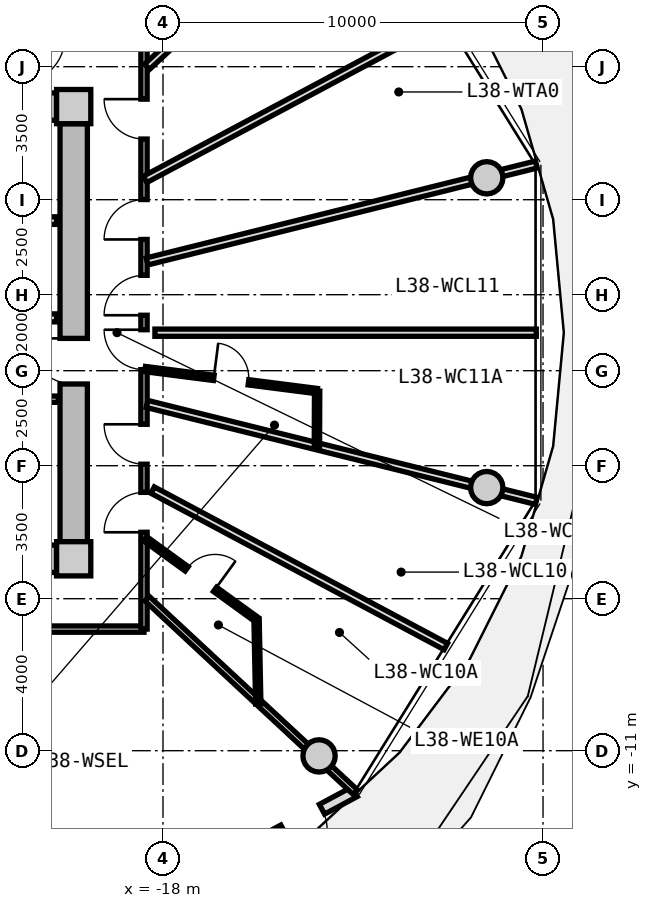
"""IFC4 building model, lengths in metres.
Left out: names, types, materials, properties, quantities, classifications, styles, units other than length and angle.
Written with IfcOpenShell. Run it as: python <this file> out.ifc"""

import sys

from ifc_helpers import new_model, si_unit, direction, frame, frame_2d, origin, origin_2d, place, context, subcontext, project, spatial, rectangle, circle, extrude, source, transform, mapped, element, fill, save


model = new_model("IFC4")
c1 = context("Model", 3, precision=1e-05, world=origin(), true_north=direction((0.0, 1.0)))
c2 = subcontext(c1, "Body", "Model", "MODEL_VIEW")
j1 = project(units=[si_unit("LENGTHUNIT", "METRE"), si_unit("PLANEANGLEUNIT", "RADIAN")], contexts=[c1])
p1 = place(None, origin())
s1 = spatial("IfcSite", under=j1, at=p1, CompositionType="ELEMENT")
p2 = place(p1, origin())
s2 = spatial("IfcBuilding", under=s1, at=p2, CompositionType="ELEMENT")
p3 = place(p2, frame((0.0, 0.0, 123.7)))
s3 = spatial("IfcBuildingStorey", under=s2, at=p3, CompositionType="ELEMENT", Elevation=123.7)
m1 = source(origin(), c2, "Body", "SweptSolid", [
    extrude(rectangle(XDim=0.9, YDim=0.9, at=origin_2d()), origin(), (0.0, 0.0, 1.0), 3.05),
])
for number, where, z_axis, x_axis in (
    (1, (-20.35, -5.95, 0.0), (0.0, 0.0, 1.0), (1.0, 0.0, 0.0)),
    (2, (-20.35, 5.95, 0.0), (0.0, 0.0, 1.0), (1.0, 0.0, 0.0)),
):
    element("IfcColumn", number, at=place(p3, frame(where, z_axis=z_axis, x_axis=x_axis)), inside=s3, PredefinedType="COLUMN", context=c2, shape_type="MappedRepresentation", body=[
        mapped(m1, transform((0.0, 0.0, 0.0), x_axis=(1.0, 0.0, 0.0), y_axis=(0.0, 1.0, 0.0), z_axis=(0.0, 0.0, 1.0), scale=1.0)),
    ])
m2 = source(origin(), c2, "Body", "SweptSolid", [
    extrude(rectangle(XDim=14.4, YDim=0.72, at=frame_2d((7.2, 0.0))), origin(), (0.0, 0.0, 1.0), 2.79),
])
for number, where, z_axis, x_axis in (
    (3, (-35.2, 5.95, 0.0), (0.0, 0.0, 1.0), (1.0, 0.0, 0.0)),
    (4, (-20.8, -5.95, 0.0), (0.0, 0.0, 1.0), (-1.0, 0.0, 0.0)),
):
    element("IfcWall", number, at=place(p3, frame(where, z_axis=z_axis, x_axis=x_axis)), inside=s3, PredefinedType="SHEAR", context=c2, shape_type="MappedRepresentation", body=[
        mapped(m2, transform((0.0, 0.0, 0.0), x_axis=(1.0, 0.0, 0.0), y_axis=(0.0, 1.0, 0.0), z_axis=(0.0, 0.0, 1.0), scale=1.0)),
    ])
m3 = source(origin(), c2, "Body", "SweptSolid", [
    extrude(rectangle(XDim=11.0, YDim=0.72, at=frame_2d((5.5, 0.0))), origin(), (0.0, 0.0, 1.0), 2.79),
])
p4 = place(p3, frame((-20.35, 5.5, 0.0), z_axis=(0.0, 0.0, 1.0), x_axis=(0.0, -1.0, 0.0)))
e5 = element("IfcWall", 5, at=p4, inside=s3, PredefinedType="SHEAR", context=c2, shape_type="MappedRepresentation", body=[
    mapped(m3, transform((0.0, 0.0, 0.0), x_axis=(1.0, 0.0, 0.0), y_axis=(0.0, 1.0, 0.0), z_axis=(0.0, 0.0, 1.0), scale=1.0)),
])
p5 = place(p4, frame((5.65, 0.0, 0.0)))
e6 = element("IfcOpeningElement", 6, at=p5, cuts=e5, PredefinedType="OPENING", context=c2, shape_type="SweptSolid", body=[
    extrude(rectangle(XDim=1.2, YDim=2.15, at=frame_2d((0.6, 1.075))), frame((0.0, 0.37, 0.0), z_axis=(0.0, -1.0, 0.0), x_axis=(1.0, 0.0, 0.0)), (0.0, 0.0, 1.0), 0.74),
])
m4 = source(origin(), c2, "Body", "SweptSolid", [
    extrude(circle(Radius=0.425, at=origin_2d()), origin(), (0.0, 0.0, 1.0), 3.05),
])
for number, where, z_axis, x_axis in (
    (7, (-9.481, 4.076, 0.0), (0.0, 0.0, 1.0), (1.0, 0.0, 0.0)),
    (8, (-13.894, -11.137, 0.0), (0.0, 0.0, 1.0), (1.0, 0.0, 0.0)),
    (9, (-9.481, -4.076, 0.0), (0.0, 0.0, 1.0), (1.0, 0.0, 0.0)),
):
    element("IfcColumn", number, at=place(p3, frame(where, z_axis=z_axis, x_axis=x_axis)), inside=s3, PredefinedType="COLUMN", context=c2, shape_type="MappedRepresentation", body=[
        mapped(m4, transform((0.0, 0.0, 0.0), x_axis=(1.0, 0.0, 0.0), y_axis=(0.0, 1.0, 0.0), z_axis=(0.0, 0.0, 1.0), scale=1.0)),
    ])
m5 = source(origin(), c2, "Body", "SweptSolid", [
    extrude(rectangle(XDim=9.351, YDim=0.29, at=frame_2d((4.675, 0.0))), origin(), (0.0, 0.0, 1.0), 2.79),
])
p6 = place(p3, frame((-12.953, -12.077, 0.0), z_axis=(0.0, 0.0, 1.0), x_axis=(-0.881184411073, -0.472772708267, 0.0)))
e10 = element("IfcWall", 10, at=p6, inside=s3, PredefinedType="SOLIDWALL", context=c2, shape_type="MappedRepresentation", body=[
    mapped(m5, transform((0.0, 0.0, 0.0), x_axis=(1.0, 0.0, 0.0), y_axis=(0.0, 1.0, 0.0), z_axis=(0.0, 0.0, 1.0), scale=1.0)),
])
p7 = place(p6, frame((0.98, 0.0, 0.0)))
e11 = element("IfcOpeningElement", 11, at=p7, cuts=e10, PredefinedType="OPENING", context=c2, shape_type="SweptSolid", body=[
    extrude(rectangle(XDim=1.15, YDim=2.25, at=frame_2d((0.575, 1.125))), frame((0.0, 0.155, 0.0), z_axis=(0.0, -1.0, 0.0), x_axis=(1.0, 0.0, 0.0)), (0.0, 0.0, 1.0), 0.31),
])
p8 = place(p6, frame((6.645, 0.0, 0.85)))
e12 = element("IfcOpeningElement", 12, at=p8, cuts=e10, PredefinedType="OPENING", context=c2, shape_type="SweptSolid", body=[
    extrude(rectangle(XDim=1.2, YDim=1.5, at=frame_2d((0.6, 0.75))), frame((0.0, 0.155, 0.0), z_axis=(0.0, -1.0, 0.0), x_axis=(1.0, 0.0, 0.0)), (0.0, 0.0, 1.0), 0.31),
])
m6 = source(origin(), c2, "Body", "SweptSolid", [
    extrude(rectangle(XDim=3.2, YDim=0.2, at=frame_2d((1.6, 0.0))), origin(), (0.0, 0.0, 1.0), 2.775),
])
p9 = place(p3, frame((-24.0, 2.95, 0.0), z_axis=(0.0, 0.0, 1.0), x_axis=(1.0, 0.0, 0.0)))
e13 = element("IfcWall", 13, at=p9, inside=s3, PredefinedType="PARTITIONING", context=c2, shape_type="MappedRepresentation", body=[
    mapped(m6, transform((0.0, 0.0, 0.0), x_axis=(1.0, 0.0, 0.0), y_axis=(0.0, 1.0, 0.0), z_axis=(0.0, 0.0, 1.0), scale=1.0)),
])
m7 = source(origin(), c2, "Body", "SweptSolid", [
    extrude(rectangle(XDim=6.66, YDim=0.21, at=frame_2d((3.33, 0.0))), origin(), (0.0, 0.0, 1.0), 2.775),
])
p10 = place(p3, frame((-27.46, 0.39, 0.0), z_axis=(0.0, 0.0, 1.0), x_axis=(1.0, 0.0, 0.0)))
e14 = element("IfcWall", 14, at=p10, inside=s3, PredefinedType="PARTITIONING", context=c2, shape_type="MappedRepresentation", body=[
    mapped(m7, transform((0.0, 0.0, 0.0), x_axis=(1.0, 0.0, 0.0), y_axis=(0.0, 1.0, 0.0), z_axis=(0.0, 0.0, 1.0), scale=1.0)),
])
p11 = place(p10, frame((1.0, 0.0, 0.0)))
e15 = element("IfcOpeningElement", 15, at=p11, cuts=e14, PredefinedType="OPENING", context=c2, shape_type="SweptSolid", body=[
    extrude(rectangle(XDim=1.2, YDim=2.15, at=frame_2d((0.6, 1.075))), frame((0.0, 0.115, 0.0), z_axis=(0.0, -1.0, 0.0), x_axis=(1.0, 0.0, 0.0)), (0.0, 0.0, 1.0), 0.23),
])
m8 = source(origin(), c2, "Body", "SweptSolid", [
    extrude(rectangle(XDim=2.7, YDim=0.165, at=frame_2d((1.35, 0.0))), origin(), (0.0, 0.0, 1.0), 2.775),
])
p12 = place(p3, frame((-23.45, -1.75, 0.0), z_axis=(0.0, 0.0, 1.0), x_axis=(1.0, 0.0, 0.0)))
e16 = element("IfcWall", 16, at=p12, inside=s3, PredefinedType="PARTITIONING", context=c2, shape_type="MappedRepresentation", body=[
    mapped(m8, transform((0.0, 0.0, 0.0), x_axis=(1.0, 0.0, 0.0), y_axis=(0.0, 1.0, 0.0), z_axis=(0.0, 0.0, 1.0), scale=1.0)),
])
p13 = place(p12, frame((0.222, 0.0, 0.0)))
e17 = element("IfcOpeningElement", 17, at=p13, cuts=e16, PredefinedType="OPENING", context=c2, shape_type="SweptSolid", body=[
    extrude(rectangle(XDim=0.925, YDim=2.1, at=frame_2d((0.462, 1.05))), frame((0.0, 0.093, 0.0), z_axis=(0.0, -1.0, 0.0), x_axis=(1.0, 0.0, 0.0)), (0.0, 0.0, 1.0), 0.185),
])
p14 = place(p12, frame((1.522, 0.0, 0.0)))
e18 = element("IfcOpeningElement", 18, at=p14, cuts=e16, PredefinedType="OPENING", context=c2, shape_type="SweptSolid", body=[
    extrude(rectangle(XDim=0.925, YDim=2.1, at=frame_2d((0.462, 1.05))), frame((0.0, 0.093, 0.0), z_axis=(0.0, -1.0, 0.0), x_axis=(1.0, 0.0, 0.0)), (0.0, 0.0, 1.0), 0.185),
])
m9 = source(origin(), c2, "Body", "SweptSolid", [
    extrude(rectangle(XDim=8.6, YDim=0.165, at=frame_2d((4.3, 0.0))), origin(), (0.0, 0.0, 1.0), 2.775),
])
p15 = place(p3, frame((-18.5, -7.8, 0.0), z_axis=(0.0, 0.0, 1.0), x_axis=(-1.0, 0.0, 0.0)))
e19 = element("IfcWall", 19, at=p15, inside=s3, PredefinedType="PARTITIONING", context=c2, shape_type="MappedRepresentation", body=[
    mapped(m9, transform((0.0, 0.0, 0.0), x_axis=(1.0, 0.0, 0.0), y_axis=(0.0, 1.0, 0.0), z_axis=(0.0, 0.0, 1.0), scale=1.0)),
])
p16 = place(p15, frame((3.509, 0.0, 0.0)))
e20 = element("IfcOpeningElement", 20, at=p16, cuts=e19, PredefinedType="OPENING", context=c2, shape_type="SweptSolid", body=[
    extrude(rectangle(XDim=1.05, YDim=2.15, at=frame_2d((0.525, 1.075))), frame((0.0, 0.093, 0.0), z_axis=(0.0, -1.0, 0.0), x_axis=(1.0, 0.0, 0.0)), (0.0, 0.0, 1.0), 0.185),
])
m10 = source(origin(), c2, "Body", "SweptSolid", [
    extrude(rectangle(XDim=15.6, YDim=0.165, at=frame_2d((7.8, 0.0))), origin(), (0.0, 0.0, 1.0), 2.775),
])
p17 = place(p3, frame((-18.5, 7.8, 0.0), z_axis=(0.0, 0.0, 1.0), x_axis=(0.0, -1.0, 0.0)))
e21 = element("IfcWall", 21, at=p17, inside=s3, PredefinedType="PARTITIONING", context=c2, shape_type="MappedRepresentation", body=[
    mapped(m10, transform((0.0, 0.0, 0.0), x_axis=(1.0, 0.0, 0.0), y_axis=(0.0, 1.0, 0.0), z_axis=(0.0, 0.0, 1.0), scale=1.0)),
])
p18 = place(p17, frame((12.002, 0.0, 0.0)))
e22 = element("IfcOpeningElement", 22, at=p18, cuts=e21, PredefinedType="OPENING", context=c2, shape_type="SweptSolid", body=[
    extrude(rectangle(XDim=1.05, YDim=2.15, at=frame_2d((0.525, 1.075))), frame((0.0, 0.093, 0.0), z_axis=(0.0, -1.0, 0.0), x_axis=(1.0, 0.0, 0.0)), (0.0, 0.0, 1.0), 0.185),
])
p19 = place(p17, frame((10.211, 0.0, 0.0)))
e23 = element("IfcOpeningElement", 23, at=p19, cuts=e21, PredefinedType="OPENING", context=c2, shape_type="SweptSolid", body=[
    extrude(rectangle(XDim=1.05, YDim=2.15, at=frame_2d((0.525, 1.075))), frame((0.0, 0.093, 0.0), z_axis=(0.0, -1.0, 0.0), x_axis=(1.0, 0.0, 0.0)), (0.0, 0.0, 1.0), 0.185),
])
p20 = place(p17, frame((7.722, 0.0, 0.0)))
e24 = element("IfcOpeningElement", 24, at=p20, cuts=e21, PredefinedType="OPENING", context=c2, shape_type="SweptSolid", body=[
    extrude(rectangle(XDim=1.05, YDim=2.15, at=frame_2d((0.525, 1.075))), frame((0.0, 0.093, 0.0), z_axis=(0.0, -1.0, 0.0), x_axis=(1.0, 0.0, 0.0)), (0.0, 0.0, 1.0), 0.185),
])
p21 = place(p17, frame((6.291, 0.0, 0.0)))
e25 = element("IfcOpeningElement", 25, at=p21, cuts=e21, PredefinedType="OPENING", context=c2, shape_type="SweptSolid", body=[
    extrude(rectangle(XDim=1.05, YDim=2.15, at=frame_2d((0.525, 1.075))), frame((0.0, 0.093, 0.0), z_axis=(0.0, -1.0, 0.0), x_axis=(1.0, 0.0, 0.0)), (0.0, 0.0, 1.0), 0.185),
])
p22 = place(p17, frame((4.296, 0.0, 0.0)))
e26 = element("IfcOpeningElement", 26, at=p22, cuts=e21, PredefinedType="OPENING", context=c2, shape_type="SweptSolid", body=[
    extrude(rectangle(XDim=1.05, YDim=2.15, at=frame_2d((0.525, 1.075))), frame((0.0, 0.093, 0.0), z_axis=(0.0, -1.0, 0.0), x_axis=(1.0, 0.0, 0.0)), (0.0, 0.0, 1.0), 0.185),
])
p23 = place(p17, frame((1.654, 0.0, 0.0)))
e27 = element("IfcOpeningElement", 27, at=p23, cuts=e21, PredefinedType="OPENING", context=c2, shape_type="SweptSolid", body=[
    extrude(rectangle(XDim=1.05, YDim=2.15, at=frame_2d((0.525, 1.075))), frame((0.0, 0.093, 0.0), z_axis=(0.0, -1.0, 0.0), x_axis=(1.0, 0.0, 0.0)), (0.0, 0.0, 1.0), 0.185),
])
m11 = source(origin(), c2, "Body", "SweptSolid", [
    extrude(rectangle(XDim=7.482, YDim=0.165, at=frame_2d((3.741, 0.0))), origin(), (0.0, 0.0, 1.0), 2.275),
])
p24 = place(p3, frame((-18.42, -6.998, 0.0), z_axis=(0.0, 0.0, 1.0), x_axis=(0.732508698043, -0.680757671489, 0.0)))
e28 = element("IfcWall", 28, at=p24, inside=s3, PredefinedType="PARTITIONING", context=c2, shape_type="MappedRepresentation", body=[
    mapped(m11, transform((0.0, 0.0, 0.0), x_axis=(1.0, 0.0, 0.0), y_axis=(0.0, 1.0, 0.0), z_axis=(0.0, 0.0, 1.0), scale=1.0)),
])
m12 = source(origin(), c2, "Body", "SweptSolid", [
    extrude(rectangle(XDim=10.556, YDim=0.19, at=frame_2d((5.278, 0.0))), origin(), (0.0, 0.0, 1.0), 2.275),
])
p25 = place(p3, frame((-18.42, -1.875, 0.0), z_axis=(0.0, 0.0, 1.0), x_axis=(0.970363857851, -0.241648470667, 0.0)))
e29 = element("IfcWall", 29, at=p25, inside=s3, PredefinedType="PARTITIONING", context=c2, shape_type="MappedRepresentation", body=[
    mapped(m12, transform((0.0, 0.0, 0.0), x_axis=(1.0, 0.0, 0.0), y_axis=(0.0, 1.0, 0.0), z_axis=(0.0, 0.0, 1.0), scale=1.0)),
])
m13 = source(origin(), c2, "Body", "SweptSolid", [
    extrude(rectangle(XDim=8.744, YDim=0.19, at=frame_2d((4.372, 0.0))), origin(), (0.0, 0.0, 1.0), 2.775),
])
p26 = place(p3, frame((-18.273, -4.142, 0.0), z_axis=(0.0, 0.0, 1.0), x_axis=(0.882252449936, -0.470776607938, 0.0)))
e30 = element("IfcWall", 30, at=p26, inside=s3, PredefinedType="PARTITIONING", context=c2, shape_type="MappedRepresentation", body=[
    mapped(m13, transform((0.0, 0.0, 0.0), x_axis=(1.0, 0.0, 0.0), y_axis=(0.0, 1.0, 0.0), z_axis=(0.0, 0.0, 1.0), scale=1.0)),
])
m14 = source(origin(), c2, "Body", "SweptSolid", [
    extrude(rectangle(XDim=3.621, YDim=0.14, at=frame_2d((1.811, 0.0))), origin(), (0.0, 0.0, 1.0), 2.775),
])
p27 = place(p3, frame((-18.47, -5.422, 0.0), z_axis=(0.0, 0.0, 1.0), x_axis=(0.80968252222, -0.586868139544, 0.0)))
e31 = element("IfcWall", 31, at=p27, inside=s3, PredefinedType="PARTITIONING", context=c2, shape_type="MappedRepresentation", body=[
    mapped(m14, transform((0.0, 0.0, 0.0), x_axis=(1.0, 0.0, 0.0), y_axis=(0.0, 1.0, 0.0), z_axis=(0.0, 0.0, 1.0), scale=1.0)),
])
p28 = place(p27, frame((1.351, 0.0, 0.0)))
e32 = element("IfcOpeningElement", 32, at=p28, cuts=e31, PredefinedType="OPENING", context=c2, shape_type="SweptSolid", body=[
    extrude(rectangle(XDim=0.92, YDim=2.1, at=frame_2d((0.46, 1.05))), frame((0.0, 0.08, 0.0), z_axis=(0.0, -1.0, 0.0), x_axis=(1.0, 0.0, 0.0)), (0.0, 0.0, 1.0), 0.16),
])
m15 = source(origin(), c2, "Body", "SweptSolid", [
    extrude(rectangle(XDim=2.225, YDim=0.14, at=frame_2d((1.112, 0.0))), origin(), (0.0, 0.0, 1.0), 2.775),
])
p29 = place(p3, frame((-15.538, -7.547, 0.0), z_axis=(0.0, 0.0, 1.0), x_axis=(0.019971869027, -0.999800542332, 0.0)))
e33 = element("IfcWall", 33, at=p29, inside=s3, PredefinedType="PARTITIONING", context=c2, shape_type="MappedRepresentation", body=[
    mapped(m15, transform((0.0, 0.0, 0.0), x_axis=(1.0, 0.0, 0.0), y_axis=(0.0, 1.0, 0.0), z_axis=(0.0, 0.0, 1.0), scale=1.0)),
])
p30 = place(p3, frame((-18.42, 1.875, 0.0), z_axis=(0.0, 0.0, 1.0), x_axis=(0.970363857851, 0.241648470667, 0.0)))
e34 = element("IfcWall", 34, at=p30, inside=s3, PredefinedType="PARTITIONING", context=c2, shape_type="MappedRepresentation", body=[
    mapped(m12, transform((0.0, 0.0, 0.0), x_axis=(1.0, 0.0, 0.0), y_axis=(0.0, 1.0, 0.0), z_axis=(0.0, 0.0, 1.0), scale=1.0)),
])
m16 = source(origin(), c2, "Body", "SweptSolid", [
    extrude(rectangle(XDim=10.036, YDim=0.19, at=frame_2d((5.018, 0.0))), origin(), (0.0, 0.0, 1.0), 2.775),
])
p31 = place(p3, frame((-18.213, 0.0, 0.0), z_axis=(0.0, 0.0, 1.0), x_axis=(1.0, 0.0, 0.0)))
e35 = element("IfcWall", 35, at=p31, inside=s3, PredefinedType="PARTITIONING", context=c2, shape_type="MappedRepresentation", body=[
    mapped(m16, transform((0.0, 0.0, 0.0), x_axis=(1.0, 0.0, 0.0), y_axis=(0.0, 1.0, 0.0), z_axis=(0.0, 0.0, 1.0), scale=1.0)),
])
m17 = source(origin(), c2, "Body", "SweptSolid", [
    extrude(rectangle(XDim=4.562, YDim=0.14, at=frame_2d((2.281, 0.0))), origin(), (0.0, 0.0, 1.0), 2.775),
])
p32 = place(p3, frame((-18.47, -0.958, 0.0), z_axis=(0.0, 0.0, 1.0), x_axis=(0.991904666356, -0.126984774129, 0.0)))
e36 = element("IfcWall", 36, at=p32, inside=s3, PredefinedType="PARTITIONING", context=c2, shape_type="MappedRepresentation", body=[
    mapped(m17, transform((0.0, 0.0, 0.0), x_axis=(1.0, 0.0, 0.0), y_axis=(0.0, 1.0, 0.0), z_axis=(0.0, 0.0, 1.0), scale=1.0)),
])
p33 = place(p32, frame((1.821, 0.0, 0.0)))
e37 = element("IfcOpeningElement", 37, at=p33, cuts=e36, PredefinedType="OPENING", context=c2, shape_type="SweptSolid", body=[
    extrude(rectangle(XDim=0.92, YDim=2.1, at=frame_2d((0.46, 1.05))), frame((0.0, 0.08, 0.0), z_axis=(0.0, -1.0, 0.0), x_axis=(1.0, 0.0, 0.0)), (0.0, 0.0, 1.0), 0.16),
])
m18 = source(origin(), c2, "Body", "SweptSolid", [
    extrude(rectangle(XDim=1.468, YDim=0.14, at=frame_2d((0.734, 0.0))), origin(), (0.0, 0.0, 1.0), 2.775),
])
p34 = place(p3, frame((-13.945, -1.537, 0.0), z_axis=(0.0, 0.0, 1.0), x_axis=(-0.00399198416, -0.999992031999, 0.0)))
e38 = element("IfcWall", 38, at=p34, inside=s3, PredefinedType="PARTITIONING", context=c2, shape_type="MappedRepresentation", body=[
    mapped(m18, transform((0.0, 0.0, 0.0), x_axis=(1.0, 0.0, 0.0), y_axis=(0.0, 1.0, 0.0), z_axis=(0.0, 0.0, 1.0), scale=1.0)),
])
m19 = source(origin(), c2, "Body", "SweptSolid", [
    extrude(rectangle(XDim=7.482, YDim=0.19, at=frame_2d((3.741, 0.0))), origin(), (0.0, 0.0, 1.0), 2.275),
])
p35 = place(p3, frame((-18.42, 6.998, 0.0), z_axis=(0.0, 0.0, 1.0), x_axis=(0.732508698043, 0.680757671489, 0.0)))
e39 = element("IfcWall", 39, at=p35, inside=s3, PredefinedType="PARTITIONING", context=c2, shape_type="MappedRepresentation", body=[
    mapped(m19, transform((0.0, 0.0, 0.0), x_axis=(1.0, 0.0, 0.0), y_axis=(0.0, 1.0, 0.0), z_axis=(0.0, 0.0, 1.0), scale=1.0)),
])
m20 = source(origin(), c2, "Body", "SweptSolid", [
    extrude(rectangle(XDim=8.968, YDim=0.19, at=frame_2d((4.484, 0.0))), origin(), (0.0, 0.0, 1.0), 2.775),
])
p36 = place(p3, frame((-18.47, 4.036, 0.0), z_axis=(0.0, 0.0, 1.0), x_axis=(0.882202936563, 0.47086938605, 0.0)))
e40 = element("IfcWall", 40, at=p36, inside=s3, PredefinedType="PARTITIONING", context=c2, shape_type="MappedRepresentation", body=[
    mapped(m20, transform((0.0, 0.0, 0.0), x_axis=(1.0, 0.0, 0.0), y_axis=(0.0, 1.0, 0.0), z_axis=(0.0, 0.0, 1.0), scale=1.0)),
])
m21 = source(origin(), c2, "Body", "SweptSolid", [
    extrude(rectangle(XDim=1.15, YDim=2.25, at=frame_2d((0.575, 1.125))), frame((0.0, 0.025, 0.0), z_axis=(0.0, -1.0, 0.0), x_axis=(1.0, 0.0, 0.0)), (0.0, 0.0, 1.0), 0.05),
])
p37 = place(p7, origin())
e41 = element("IfcDoor", 41, at=p37, inside=s3, OperationType="SINGLE_SWING_RIGHT", PredefinedType="DOOR", context=c2, shape_type="MappedRepresentation", body=[
    mapped(m21, transform((0.0, 0.0, 0.0), x_axis=(1.0, 0.0, 0.0), y_axis=(0.0, 1.0, 0.0), z_axis=(0.0, 0.0, 1.0), scale=1.0)),
])
fill(e11, e41)
m22 = source(origin(), c2, "Body", "SweptSolid", [
    extrude(rectangle(XDim=1.2, YDim=2.15, at=frame_2d((0.6, 1.075))), frame((0.0, 0.025, 0.0), z_axis=(0.0, -1.0, 0.0), x_axis=(1.0, 0.0, 0.0)), (0.0, 0.0, 1.0), 0.05),
])
p38 = place(p5, frame((1.2, 0.0, 0.0), z_axis=(0.0, 0.0, 1.0), x_axis=(-1.0, 0.0, 0.0)))
e42 = element("IfcDoor", 42, at=p38, inside=s3, OperationType="SINGLE_SWING_RIGHT", PredefinedType="DOOR", context=c2, shape_type="MappedRepresentation", body=[
    mapped(m22, transform((0.0, 0.0, 0.0), x_axis=(1.0, 0.0, 0.0), y_axis=(0.0, 1.0, 0.0), z_axis=(0.0, 0.0, 1.0), scale=1.0)),
])
fill(e6, e42)
m23 = source(origin(), c2, "Body", "SweptSolid", [
    extrude(rectangle(XDim=1.05, YDim=2.15, at=frame_2d((0.525, 1.075))), frame((0.0, 0.025, 0.0), z_axis=(0.0, -1.0, 0.0), x_axis=(1.0, 0.0, 0.0)), (0.0, 0.0, 1.0), 0.05),
])
p39 = place(p18, frame((1.05, 0.0, 0.0), z_axis=(0.0, 0.0, 1.0), x_axis=(-1.0, 0.0, 0.0)))
e43 = element("IfcDoor", 43, at=p39, inside=s3, OperationType="SINGLE_SWING_LEFT", PredefinedType="DOOR", context=c2, shape_type="MappedRepresentation", body=[
    mapped(m23, transform((0.0, 0.0, 0.0), x_axis=(1.0, 0.0, 0.0), y_axis=(0.0, 1.0, 0.0), z_axis=(0.0, 0.0, 1.0), scale=1.0)),
])
fill(e22, e43)
m24 = source(origin(), c2, "Body", "SweptSolid", [
    extrude(rectangle(XDim=0.92, YDim=2.1, at=frame_2d((0.46, 1.05))), frame((0.0, 0.025, 0.0), z_axis=(0.0, -1.0, 0.0), x_axis=(1.0, 0.0, 0.0)), (0.0, 0.0, 1.0), 0.05),
])
p40 = place(p28, origin())
e44 = element("IfcDoor", 44, at=p40, inside=s3, OperationType="SINGLE_SWING_RIGHT", PredefinedType="DOOR", context=c2, shape_type="MappedRepresentation", body=[
    mapped(m24, transform((0.0, 0.0, 0.0), x_axis=(1.0, 0.0, 0.0), y_axis=(0.0, 1.0, 0.0), z_axis=(0.0, 0.0, 1.0), scale=1.0)),
])
fill(e32, e44)
p41 = place(p19, frame((1.05, 0.0, 0.0), z_axis=(0.0, 0.0, 1.0), x_axis=(-1.0, 0.0, 0.0)))
e45 = element("IfcDoor", 45, at=p41, inside=s3, OperationType="SINGLE_SWING_RIGHT", PredefinedType="DOOR", context=c2, shape_type="MappedRepresentation", body=[
    mapped(m23, transform((0.0, 0.0, 0.0), x_axis=(1.0, 0.0, 0.0), y_axis=(0.0, 1.0, 0.0), z_axis=(0.0, 0.0, 1.0), scale=1.0)),
])
fill(e23, e45)
p42 = place(p20, frame((1.05, 0.0, 0.0), z_axis=(0.0, 0.0, 1.0), x_axis=(-1.0, 0.0, 0.0)))
e46 = element("IfcDoor", 46, at=p42, inside=s3, OperationType="SINGLE_SWING_RIGHT", PredefinedType="DOOR", context=c2, shape_type="MappedRepresentation", body=[
    mapped(m23, transform((0.0, 0.0, 0.0), x_axis=(1.0, 0.0, 0.0), y_axis=(0.0, 1.0, 0.0), z_axis=(0.0, 0.0, 1.0), scale=1.0)),
])
fill(e24, e46)
p43 = place(p33, origin())
e47 = element("IfcDoor", 47, at=p43, inside=s3, OperationType="SINGLE_SWING_LEFT", PredefinedType="DOOR", context=c2, shape_type="MappedRepresentation", body=[
    mapped(m24, transform((0.0, 0.0, 0.0), x_axis=(1.0, 0.0, 0.0), y_axis=(0.0, 1.0, 0.0), z_axis=(0.0, 0.0, 1.0), scale=1.0)),
])
fill(e37, e47)
p44 = place(p21, frame((1.05, 0.0, 0.0), z_axis=(0.0, 0.0, 1.0), x_axis=(-1.0, 0.0, 0.0)))
e48 = element("IfcDoor", 48, at=p44, inside=s3, OperationType="SINGLE_SWING_LEFT", PredefinedType="DOOR", context=c2, shape_type="MappedRepresentation", body=[
    mapped(m23, transform((0.0, 0.0, 0.0), x_axis=(1.0, 0.0, 0.0), y_axis=(0.0, 1.0, 0.0), z_axis=(0.0, 0.0, 1.0), scale=1.0)),
])
fill(e25, e48)
p45 = place(p22, frame((1.05, 0.0, 0.0), z_axis=(0.0, 0.0, 1.0), x_axis=(-1.0, 0.0, 0.0)))
e49 = element("IfcDoor", 49, at=p45, inside=s3, OperationType="SINGLE_SWING_LEFT", PredefinedType="DOOR", context=c2, shape_type="MappedRepresentation", body=[
    mapped(m23, transform((0.0, 0.0, 0.0), x_axis=(1.0, 0.0, 0.0), y_axis=(0.0, 1.0, 0.0), z_axis=(0.0, 0.0, 1.0), scale=1.0)),
])
fill(e26, e49)
p46 = place(p23, frame((1.05, 0.0, 0.0), z_axis=(0.0, 0.0, 1.0), x_axis=(-1.0, 0.0, 0.0)))
e50 = element("IfcDoor", 50, at=p46, inside=s3, OperationType="SINGLE_SWING_RIGHT", PredefinedType="DOOR", context=c2, shape_type="MappedRepresentation", body=[
    mapped(m23, transform((0.0, 0.0, 0.0), x_axis=(1.0, 0.0, 0.0), y_axis=(0.0, 1.0, 0.0), z_axis=(0.0, 0.0, 1.0), scale=1.0)),
])
fill(e27, e50)
save(model, sys.argv[1])
